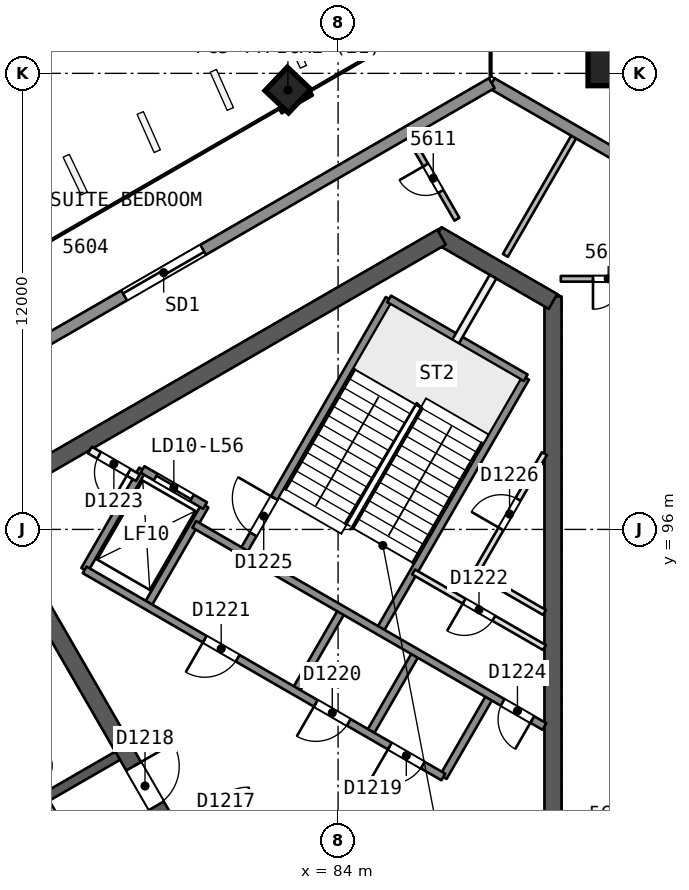
"""IFC4 building model, lengths in metres.
Left out: names, types, materials, properties, quantities, classifications, styles, units other than length and angle.
Written with IfcOpenShell. Run it as: python <this file> out.ifc"""

import sys

from ifc_helpers import new_model, si_unit, direction, frame, frame_2d, origin, origin_2d, place, context, subcontext, project, spatial, rectangle, extrude, element, fill, save


model = new_model("IFC4")
c1 = context("Model", 3, precision=1e-05, world=origin(), true_north=direction((0.0, 1.0)))
c2 = subcontext(c1, "Body", "Model", "MODEL_VIEW")
j1 = project(units=[si_unit("LENGTHUNIT", "METRE"), si_unit("PLANEANGLEUNIT", "RADIAN")], contexts=[c1])
p1 = place(None, origin())
s1 = spatial("IfcSite", under=j1, at=p1, CompositionType="ELEMENT")
p2 = place(p1, origin())
s2 = spatial("IfcBuilding", under=s1, at=p2, CompositionType="ELEMENT")
p3 = place(p2, frame((0.0, 0.0, 228.0)))
s3 = spatial("IfcBuildingStorey", under=s2, at=p3, CompositionType="ELEMENT", Elevation=228.0)
p4 = place(p3, frame((89.655, 88.019, 0.0), z_axis=(0.0, 0.0, 1.0), x_axis=(0.0, 1.0, 0.0)))
e1 = element("IfcWall", 1, at=p4, inside=s3, PredefinedType="SHEAR", context=c2, shape_type="SweptSolid", body=[
    extrude(rectangle(XDim=14.108, YDim=0.45, at=frame_2d((7.054, 0.0))), origin(), (0.0, 0.0, 1.0), 3.7),
])
p5 = place(p3, frame((89.655, 101.998, 0.0), z_axis=(0.0, 0.0, 1.0), x_axis=(-0.866042179588, 0.49997094233, 0.0)))
e2 = element("IfcWall", 2, at=p5, inside=s3, PredefinedType="SHEAR", context=c2, shape_type="SweptSolid", body=[
    extrude(rectangle(XDim=3.515, YDim=0.45, at=frame_2d((1.758, 0.0))), origin(), (0.0, 0.0, 1.0), 3.7),
])
p6 = place(p3, frame((86.723, 103.69, 0.0), z_axis=(0.0, 0.0, 1.0), x_axis=(-0.866022713978, -0.500004658852, 0.0)))
e3 = element("IfcWall", 3, at=p6, inside=s3, PredefinedType="SHEAR", context=c2, shape_type="SweptSolid", body=[
    extrude(rectangle(XDim=14.203, YDim=0.45, at=frame_2d((7.102, 0.0))), origin(), (0.0, 0.0, 1.0), 3.7),
])
p7 = place(p3, frame((74.617, 96.701, 0.0), z_axis=(0.0, 0.0, 1.0), x_axis=(0.499994385119, -0.866028645513, 0.0)))
e4 = element("IfcWall", 4, at=p7, inside=s3, PredefinedType="SHEAR", context=c2, shape_type="SweptSolid", body=[
    extrude(rectangle(XDim=10.155, YDim=0.45, at=frame_2d((5.077, 0.0))), origin(), (0.0, 0.0, 1.0), 3.7),
])
p8 = place(p7, frame((8.005, 0.0, 0.0)))
e5 = element("IfcOpeningElement", 5, at=p8, cuts=e4, PredefinedType="OPENING", context=c2, shape_type="SweptSolid", body=[
    extrude(rectangle(XDim=1.2, YDim=2.1, at=frame_2d((0.6, 1.05))), frame((0.0, 0.235, 0.0), z_axis=(0.0, -1.0, 0.0), x_axis=(1.0, 0.0, 0.0)), (0.0, 0.0, 1.0), 0.471),
])
p9 = place(p3, frame((78.2, 90.046, 0.0), z_axis=(0.0, 0.0, 1.0), x_axis=(-0.866026492143, -0.499998114903, 0.0)))
e6 = element("IfcWall", 6, at=p9, inside=s3, PredefinedType="SHEAR", context=c2, shape_type="SweptSolid", body=[
    extrude(rectangle(XDim=15.588, YDim=0.25, at=frame_2d((7.794, 0.0))), origin(), (0.0, 0.0, 1.0), 3.3),
])
p10 = place(p9, frame((2.15, 0.0, 0.0)))
e7 = element("IfcOpeningElement", 7, at=p10, cuts=e6, PredefinedType="OPENING", context=c2, shape_type="SweptSolid", body=[
    extrude(rectangle(XDim=1.0, YDim=2.1, at=frame_2d((0.5, 1.05))), frame((0.0, 0.135, 0.0), z_axis=(0.0, -1.0, 0.0), x_axis=(1.0, 0.0, 0.0)), (0.0, 0.0, 1.0), 0.271),
])
p11 = place(p9, frame((8.538, 0.0, 0.0)))
e8 = element("IfcOpeningElement", 8, at=p11, cuts=e6, PredefinedType="OPENING", context=c2, shape_type="SweptSolid", body=[
    extrude(rectangle(XDim=1.1, YDim=2.1, at=frame_2d((0.55, 1.05))), frame((0.0, 0.135, 0.0), z_axis=(0.0, -1.0, 0.0), x_axis=(1.0, 0.0, 0.0)), (0.0, 0.0, 1.0), 0.271),
])
p12 = place(p9, frame((12.282, 0.0, 0.0)))
e9 = element("IfcOpeningElement", 9, at=p12, cuts=e6, PredefinedType="OPENING", context=c2, shape_type="SweptSolid", body=[
    extrude(rectangle(XDim=1.0, YDim=2.1, at=frame_2d((0.5, 1.05))), frame((0.0, 0.135, 0.0), z_axis=(0.0, -1.0, 0.0), x_axis=(1.0, 0.0, 0.0)), (0.0, 0.0, 1.0), 0.271),
])
p13 = place(p3, frame((91.548, 108.662, 0.0), z_axis=(-0.017607037296, -0.030466109479, 0.999380712447), x_axis=(0.865812389079, -0.500368770925, 1.01334e-07)))
e10 = element("IfcColumn", 10, at=p13, inside=s3, PredefinedType="COLUMN", context=c2, shape_type="SweptSolid", body=[
    extrude(rectangle(XDim=1.9, YDim=1.9, at=origin_2d()), origin(), (0.0, 0.0, 1.0), 3.702),
])
p14 = place(p3, frame((82.69, 107.594, 0.0), z_axis=(-0.008376454378, -0.028163354484, 0.999568237028), x_axis=(0.865846453702, 0.49985452246, 0.021339517038)))
e11 = element("IfcColumn", 11, at=p14, inside=s3, PredefinedType="COLUMN", context=c2, shape_type="SweptSolid", body=[
    extrude(rectangle(XDim=0.85, YDim=0.85, at=origin_2d()), origin(), (0.0, 0.0, 1.0), 3.702),
])
p15 = place(p3, frame((92.354, 102.594, 0.0), z_axis=(0.0, 0.0, 1.0), x_axis=(-1.0, 0.0, 0.0)))
e12 = element("IfcWall", 12, at=p15, inside=s3, PredefinedType="PARTITIONING", context=c2, shape_type="SweptSolid", body=[
    extrude(rectangle(XDim=2.492, YDim=0.15, at=frame_2d((1.246, 0.0))), origin(), (0.0, 0.0, 1.0), 3.3),
])
p16 = place(p15, frame((0.846, 0.0, 0.0)))
e13 = element("IfcOpeningElement", 13, at=p16, cuts=e12, PredefinedType="OPENING", context=c2, shape_type="SweptSolid", body=[
    extrude(rectangle(XDim=0.8, YDim=2.1, at=frame_2d((0.4, 1.05))), frame((0.0, 0.085, 0.0), z_axis=(0.0, -1.0, 0.0), x_axis=(1.0, 0.0, 0.0)), (0.0, 0.0, 1.0), 0.171),
])
p17 = place(p3, frame((90.199, 106.324, 0.0), z_axis=(0.0, 0.0, 1.0), x_axis=(-0.500032055595, -0.866006895687, 0.0)))
e14 = element("IfcWall", 14, at=p17, inside=s3, PredefinedType="PARTITIONING", context=c2, shape_type="SweptSolid", body=[
    extrude(rectangle(XDim=3.595, YDim=0.15, at=frame_2d((1.797, 0.0))), origin(), (0.0, 0.0, 1.0), 3.3),
])
p18 = place(p3, frame((87.127, 104.162, 0.0), z_axis=(0.0, 0.0, 1.0), x_axis=(-0.500047477074, 0.865997991148, 0.0)))
e15 = element("IfcWall", 15, at=p18, inside=s3, PredefinedType="PARTITIONING", context=c2, shape_type="SweptSolid", body=[
    extrude(rectangle(XDim=2.492, YDim=0.15, at=frame_2d((1.246, 0.0))), origin(), (0.0, 0.0, 1.0), 3.3),
])
p19 = place(p18, frame((0.846, 0.0, 0.0)))
e16 = element("IfcOpeningElement", 16, at=p19, cuts=e15, PredefinedType="OPENING", context=c2, shape_type="SweptSolid", body=[
    extrude(rectangle(XDim=0.8, YDim=2.1, at=frame_2d((0.4, 1.05))), frame((0.0, 0.085, 0.0), z_axis=(0.0, -1.0, 0.0), x_axis=(1.0, 0.0, 0.0)), (0.0, 0.0, 1.0), 0.171),
])
p20 = place(p3, frame((88.043, 107.741, 0.0), z_axis=(0.0, 0.0, 1.0), x_axis=(0.866011086668, -0.500024797153, 0.0)))
e17 = element("IfcWall", 17, at=p20, inside=s3, PredefinedType="SOLIDWALL", context=c2, shape_type="SweptSolid", body=[
    extrude(rectangle(XDim=5.149, YDim=0.3, at=frame_2d((2.575, 0.0))), origin(), (0.0, 0.0, 1.0), 3.3),
])
p21 = place(p3, frame((44.454, 82.574, 0.0), z_axis=(0.0, 0.0, 1.0), x_axis=(0.86602387423, 0.500002649256, 0.0)))
e18 = element("IfcWall", 18, at=p21, inside=s3, PredefinedType="SOLIDWALL", context=c2, shape_type="SweptSolid", body=[
    extrude(rectangle(XDim=50.333, YDim=0.3, at=frame_2d((25.167, 0.0))), origin(), (0.0, 0.0, 1.0), 3.3),
])
p22 = place(p21, frame((24.122, 0.0, 0.0)))
e19 = element("IfcOpeningElement", 19, at=p22, cuts=e18, PredefinedType="OPENING", context=c2, shape_type="SweptSolid", body=[
    extrude(rectangle(XDim=2.4, YDim=2.4, at=frame_2d((1.2, 1.2))), frame((0.0, 0.161, 0.0), z_axis=(0.0, -1.0, 0.0), x_axis=(1.0, 0.0, 0.0)), (0.0, 0.0, 1.0), 0.321),
])
p23 = place(p21, frame((29.111, 0.0, 0.0)))
e20 = element("IfcOpeningElement", 20, at=p23, cuts=e18, PredefinedType="OPENING", context=c2, shape_type="SweptSolid", body=[
    extrude(rectangle(XDim=2.4, YDim=2.4, at=frame_2d((1.2, 1.2))), frame((0.0, 0.161, 0.0), z_axis=(0.0, -1.0, 0.0), x_axis=(1.0, 0.0, 0.0)), (0.0, 0.0, 1.0), 0.321),
])
p24 = place(p21, frame((39.164, 0.0, 0.0)))
e21 = element("IfcOpeningElement", 21, at=p24, cuts=e18, PredefinedType="OPENING", context=c2, shape_type="SweptSolid", body=[
    extrude(rectangle(XDim=2.4, YDim=2.4, at=frame_2d((1.2, 1.2))), frame((0.0, 0.161, 0.0), z_axis=(0.0, -1.0, 0.0), x_axis=(1.0, 0.0, 0.0)), (0.0, 0.0, 1.0), 0.321),
])
p25 = place(p21, frame((18.978, 0.0, 0.0)))
e22 = element("IfcOpeningElement", 22, at=p25, cuts=e18, PredefinedType="OPENING", context=c2, shape_type="SweptSolid", body=[
    extrude(rectangle(XDim=2.4, YDim=2.4, at=frame_2d((1.2, 1.2))), frame((0.0, 0.161, 0.0), z_axis=(0.0, -1.0, 0.0), x_axis=(1.0, 0.0, 0.0)), (0.0, 0.0, 1.0), 0.321),
])
p26 = place(p21, frame((8.763, 0.0, 0.0)))
e23 = element("IfcOpeningElement", 23, at=p26, cuts=e18, PredefinedType="OPENING", context=c2, shape_type="SweptSolid", body=[
    extrude(rectangle(XDim=2.4, YDim=2.4, at=frame_2d((1.2, 1.2))), frame((0.0, 0.161, 0.0), z_axis=(0.0, -1.0, 0.0), x_axis=(1.0, 0.0, 0.0)), (0.0, 0.0, 1.0), 0.321),
])
p27 = place(p3, frame((86.77, 89.486, 0.0), z_axis=(0.0, 0.0, 1.0), x_axis=(0.499961042966, 0.86604789447, 0.0)))
e24 = element("IfcWall", 24, at=p27, inside=s3, PredefinedType="SOLIDWALL", context=c2, shape_type="SweptSolid", body=[
    extrude(rectangle(XDim=2.48, YDim=0.2, at=frame_2d((1.24, 0.0))), origin(), (0.0, 0.0, 1.0), 3.3),
])
p28 = place(p3, frame((87.621, 94.86, 0.0), z_axis=(0.0, 0.0, 1.0), x_axis=(0.499993116331, 0.866029378036, 0.0)))
e25 = element("IfcWall", 25, at=p28, inside=s3, PredefinedType="PARTITIONING", context=c2, shape_type="SweptSolid", body=[
    extrude(rectangle(XDim=3.618, YDim=0.15, at=frame_2d((1.809, 0.0))), origin(), (0.0, 0.0, 1.0), 3.3),
])
p29 = place(p28, frame((1.332, 0.0, 0.0)))
e26 = element("IfcOpeningElement", 26, at=p29, cuts=e25, PredefinedType="OPENING", context=c2, shape_type="SweptSolid", body=[
    extrude(rectangle(XDim=0.9, YDim=2.1, at=frame_2d((0.45, 1.05))), frame((0.0, 0.085, 0.0), z_axis=(0.0, -1.0, 0.0), x_axis=(1.0, 0.0, 0.0)), (0.0, 0.0, 1.0), 0.171),
])
p30 = place(p3, frame((84.821, 90.611, 0.0), z_axis=(0.0, 0.0, 1.0), x_axis=(0.499961042966, 0.86604789447, 0.0)))
e27 = element("IfcWall", 27, at=p30, inside=s3, PredefinedType="SOLIDWALL", context=c2, shape_type="SweptSolid", body=[
    extrude(rectangle(XDim=2.48, YDim=0.2, at=frame_2d((1.24, 0.0))), origin(), (0.0, 0.0, 1.0), 3.3),
])
p31 = place(p3, frame((85.087, 93.321, 0.0), z_axis=(0.0, 0.0, 1.0), x_axis=(0.500019787375, 0.866013979237, 0.0)))
e28 = element("IfcWall", 28, at=p31, inside=s3, PredefinedType="SOLIDWALL", context=c2, shape_type="SweptSolid", body=[
    extrude(rectangle(XDim=7.7, YDim=0.2, at=frame_2d((3.85, 0.0))), origin(), (0.0, 0.0, 1.0), 3.3),
])
p32 = place(p3, frame((82.873, 91.736, 0.0), z_axis=(0.0, 0.0, 1.0), x_axis=(0.499961042966, 0.86604789447, 0.0)))
e29 = element("IfcWall", 29, at=p32, inside=s3, PredefinedType="SOLIDWALL", context=c2, shape_type="SweptSolid", body=[
    extrude(rectangle(XDim=2.48, YDim=0.2, at=frame_2d((1.24, 0.0))), origin(), (0.0, 0.0, 1.0), 3.3),
])
p33 = place(p3, frame((87.09, 100.94, 0.0), z_axis=(0.0, 0.0, 1.0), x_axis=(0.500011643316, 0.866018681408, 0.0)))
e30 = element("IfcWall", 30, at=p33, inside=s3, PredefinedType="PARTITIONING", context=c2, shape_type="SweptSolid", body=[
    extrude(rectangle(XDim=1.973, YDim=0.2, at=frame_2d((0.987, 0.0))), origin(), (0.0, 0.0, 1.0), 3.3),
])
p34 = place(p3, frame((81.493, 95.396, 0.0), z_axis=(0.0, 0.0, 1.0), x_axis=(0.500006057782, 0.866021906294, 0.0)))
e31 = element("IfcWall", 31, at=p34, inside=s3, PredefinedType="SOLIDWALL", context=c2, shape_type="SweptSolid", body=[
    extrude(rectangle(XDim=7.7, YDim=0.2, at=frame_2d((3.85, 0.0))), origin(), (0.0, 0.0, 1.0), 3.3),
])
p35 = place(p34, frame((0.55, 0.0, 0.0)))
e32 = element("IfcOpeningElement", 32, at=p35, cuts=e31, PredefinedType="OPENING", context=c2, shape_type="SweptSolid", body=[
    extrude(rectangle(XDim=1.1, YDim=2.1, at=frame_2d((0.55, 1.05))), frame((0.0, 0.11, 0.0), z_axis=(0.0, -1.0, 0.0), x_axis=(1.0, 0.0, 0.0)), (0.0, 0.0, 1.0), 0.221),
])
for number, where, z_axis, x_axis in (
    (33, (78.976, 93.986, 0.0), (0.0, 0.0, 1.0), (0.5, 0.866, 0.0)),
    (34, (77.33, 94.936, 0.0), (0.0, 0.0, 1.0), (0.5, 0.866, 0.0)),
):
    element("IfcWall", number, at=place(p3, frame(where, z_axis=z_axis, x_axis=x_axis)), inside=s3, PredefinedType="SOLIDWALL", context=c2, shape_type="SweptSolid", body=[
        extrude(rectangle(XDim=3.05, YDim=0.2, at=frame_2d((1.525, 0.0))), origin(), (0.0, 0.0, 1.0), 3.3),
    ])
p36 = place(p3, frame((86.77, 89.486, 0.0), z_axis=(0.0, 0.0, 1.0), x_axis=(-0.86601811187, 0.500012629753, 0.0)))
e35 = element("IfcWall", 35, at=p36, inside=s3, PredefinedType="SOLIDWALL", context=c2, shape_type="SweptSolid", body=[
    extrude(rectangle(XDim=10.9, YDim=0.2, at=frame_2d((5.45, 0.0))), origin(), (0.0, 0.0, 1.0), 3.3),
])
p37 = place(p36, frame((0.625, 0.0, 0.0)))
e36 = element("IfcOpeningElement", 36, at=p37, cuts=e35, PredefinedType="OPENING", context=c2, shape_type="SweptSolid", body=[
    extrude(rectangle(XDim=1.0, YDim=2.1, at=frame_2d((0.5, 1.05))), frame((0.0, 0.11, 0.0), z_axis=(0.0, -1.0, 0.0), x_axis=(1.0, 0.0, 0.0)), (0.0, 0.0, 1.0), 0.221),
])
p38 = place(p36, frame((2.875, 0.0, 0.0)))
e37 = element("IfcOpeningElement", 37, at=p38, cuts=e35, PredefinedType="OPENING", context=c2, shape_type="SweptSolid", body=[
    extrude(rectangle(XDim=1.0, YDim=2.1, at=frame_2d((0.5, 1.05))), frame((0.0, 0.11, 0.0), z_axis=(0.0, -1.0, 0.0), x_axis=(1.0, 0.0, 0.0)), (0.0, 0.0, 1.0), 0.221),
])
p39 = place(p36, frame((6.25, 0.0, 0.0)))
e38 = element("IfcOpeningElement", 38, at=p39, cuts=e35, PredefinedType="OPENING", context=c2, shape_type="SweptSolid", body=[
    extrude(rectangle(XDim=1.0, YDim=2.1, at=frame_2d((0.5, 1.05))), frame((0.0, 0.11, 0.0), z_axis=(0.0, -1.0, 0.0), x_axis=(1.0, 0.0, 0.0)), (0.0, 0.0, 1.0), 0.221),
])
p40 = place(p3, frame((89.43, 90.814, 0.0), z_axis=(0.0, 0.0, 1.0), x_axis=(-0.866018983788, 0.500011119594, 0.0)))
e39 = element("IfcWall", 39, at=p40, inside=s3, PredefinedType="SOLIDWALL", context=c2, shape_type="SweptSolid", body=[
    extrude(rectangle(XDim=10.64, YDim=0.2, at=frame_2d((5.32, 0.0))), origin(), (0.0, 0.0, 1.0), 3.3),
])
p41 = place(p40, frame((0.37, 0.0, 0.0)))
e40 = element("IfcOpeningElement", 40, at=p41, cuts=e39, PredefinedType="OPENING", context=c2, shape_type="SweptSolid", body=[
    extrude(rectangle(XDim=0.9, YDim=2.1, at=frame_2d((0.45, 1.05))), frame((0.0, 0.11, 0.0), z_axis=(0.0, -1.0, 0.0), x_axis=(1.0, 0.0, 0.0)), (0.0, 0.0, 1.0), 0.221),
])
p42 = place(p3, frame((78.73, 97.361, 0.0), z_axis=(0.0, 0.0, 1.0), x_axis=(-0.866045896294, 0.499964504253, 0.0)))
e41 = element("IfcWall", 41, at=p42, inside=s3, PredefinedType="PARTITIONING", context=c2, shape_type="SweptSolid", body=[
    extrude(rectangle(XDim=1.455, YDim=0.2, at=frame_2d((0.728, 0.0))), origin(), (0.0, 0.0, 1.0), 3.3),
])
p43 = place(p42, frame((0.278, 0.0, 0.0)))
e42 = element("IfcOpeningElement", 42, at=p43, cuts=e41, PredefinedType="OPENING", context=c2, shape_type="SweptSolid", body=[
    extrude(rectangle(XDim=0.9, YDim=2.1, at=frame_2d((0.45, 1.05))), frame((0.0, 0.11, 0.0), z_axis=(0.0, -1.0, 0.0), x_axis=(1.0, 0.0, 0.0)), (0.0, 0.0, 1.0), 0.221),
])
p44 = place(p3, frame((80.5, 96.627, 0.0), z_axis=(0.0, 0.0, 1.0), x_axis=(-0.86601224135, 0.500022797313, 0.0)))
e43 = element("IfcWall", 43, at=p44, inside=s3, PredefinedType="SOLIDWALL", context=c2, shape_type="SweptSolid", body=[
    extrude(rectangle(XDim=1.9, YDim=0.2, at=frame_2d((0.95, 0.0))), origin(), (0.0, 0.0, 1.0), 3.3),
])
p45 = place(p44, frame((0.4, 0.0, 0.0)))
e44 = element("IfcOpeningElement", 44, at=p45, cuts=e43, PredefinedType="OPENING", context=c2, shape_type="SweptSolid", body=[
    extrude(rectangle(XDim=1.1, YDim=2.1, at=frame_2d((0.55, 1.05))), frame((0.0, 0.11, 0.0), z_axis=(0.0, -1.0, 0.0), x_axis=(1.0, 0.0, 0.0)), (0.0, 0.0, 1.0), 0.221),
])
p46 = place(p3, frame((89.43, 92.892, 0.0), z_axis=(0.0, 0.0, 1.0), x_axis=(-0.866019912421, 0.500009511199, 0.0)))
e45 = element("IfcWall", 45, at=p46, inside=s3, PredefinedType="PARTITIONING", context=c2, shape_type="SweptSolid", body=[
    extrude(rectangle(XDim=3.976, YDim=0.15, at=frame_2d((1.988, 0.0))), origin(), (0.0, 0.0, 1.0), 3.3),
])
p47 = place(p46, frame((1.538, 0.0, 0.0)))
e46 = element("IfcOpeningElement", 46, at=p47, cuts=e45, PredefinedType="OPENING", context=c2, shape_type="SweptSolid", body=[
    extrude(rectangle(XDim=0.9, YDim=2.1, at=frame_2d((0.45, 1.05))), frame((0.0, 0.085, 0.0), z_axis=(0.0, -1.0, 0.0), x_axis=(1.0, 0.0, 0.0)), (0.0, 0.0, 1.0), 0.171),
])
p48 = place(p3, frame((89.43, 93.816, 0.0), z_axis=(0.0, 0.0, 1.0), x_axis=(-0.866004557827, 0.500036104519, 0.0)))
e47 = element("IfcWall", 47, at=p48, inside=s3, PredefinedType="PARTITIONING", context=c2, shape_type="SweptSolid", body=[
    extrude(rectangle(XDim=2.089, YDim=0.15, at=frame_2d((1.044, 0.0))), origin(), (0.0, 0.0, 1.0), 3.3),
])
p49 = place(p3, frame((88.937, 99.99, 0.0), z_axis=(0.0, 0.0, 1.0), x_axis=(-0.866004344652, 0.500036473714, 0.0)))
e48 = element("IfcWall", 48, at=p49, inside=s3, PredefinedType="SOLIDWALL", context=c2, shape_type="SweptSolid", body=[
    extrude(rectangle(XDim=4.15, YDim=0.2, at=frame_2d((2.075, 0.0))), origin(), (0.0, 0.0, 1.0), 3.3),
])
p50 = place(p16, origin())
e49 = element("IfcDoor", 49, at=p50, inside=s3, OperationType="SINGLE_SWING_RIGHT", PredefinedType="NOTDEFINED", context=c2, shape_type="SweptSolid", body=[
    extrude(rectangle(XDim=0.8, YDim=2.1, at=frame_2d((0.4, 1.05))), frame((0.0, 0.025, 0.0), z_axis=(0.0, -1.0, 0.0), x_axis=(1.0, 0.0, 0.0)), (0.0, 0.0, 1.0), 0.05),
])
fill(e13, e49)
p51 = place(p19, origin())
e50 = element("IfcDoor", 50, at=p51, inside=s3, OperationType="SINGLE_SWING_RIGHT", PredefinedType="NOTDEFINED", context=c2, shape_type="SweptSolid", body=[
    extrude(rectangle(XDim=0.8, YDim=2.1, at=frame_2d((0.4, 1.05))), frame((0.0, 0.025, 0.0), z_axis=(0.0, -1.0, 0.0), x_axis=(1.0, 0.0, 0.0)), (0.0, 0.0, 1.0), 0.05),
])
fill(e16, e50)
p52 = place(p24, origin())
e51 = element("IfcDoor", 51, at=p52, inside=s3, OperationType="SLIDING_TO_LEFT", PredefinedType="NOTDEFINED", context=c2, shape_type="SweptSolid", body=[
    extrude(rectangle(XDim=2.4, YDim=2.4, at=frame_2d((1.2, 1.2))), frame((0.0, 0.025, 0.0), z_axis=(0.0, -1.0, 0.0), x_axis=(1.0, 0.0, 0.0)), (0.0, 0.0, 1.0), 0.05),
])
fill(e21, e51)
p53 = place(p8, origin())
e52 = element("IfcDoor", 52, at=p53, inside=s3, OperationType="SINGLE_SWING_LEFT", PredefinedType="NOTDEFINED", context=c2, shape_type="SweptSolid", body=[
    extrude(rectangle(XDim=1.2, YDim=2.1, at=frame_2d((0.6, 1.05))), frame((0.0, 0.025, 0.0), z_axis=(0.0, -1.0, 0.0), x_axis=(1.0, 0.0, 0.0)), (0.0, 0.0, 1.0), 0.05),
])
fill(e5, e52)
p54 = place(p45, origin())
e53 = element("IfcDoor", 53, at=p54, inside=s3, OperationType="SLIDING_TO_RIGHT", PredefinedType="NOTDEFINED", context=c2, shape_type="SweptSolid", body=[
    extrude(rectangle(XDim=1.1, YDim=2.1, at=frame_2d((0.55, 1.05))), frame((0.0, 0.025, 0.0), z_axis=(0.0, -1.0, 0.0), x_axis=(1.0, 0.0, 0.0)), (0.0, 0.0, 1.0), 0.05),
])
fill(e44, e53)
p55 = place(p37, origin())
e54 = element("IfcDoor", 54, at=p55, inside=s3, OperationType="SINGLE_SWING_RIGHT", PredefinedType="NOTDEFINED", context=c2, shape_type="SweptSolid", body=[
    extrude(rectangle(XDim=1.0, YDim=2.1, at=frame_2d((0.5, 1.05))), frame((0.0, 0.025, 0.0), z_axis=(0.0, -1.0, 0.0), x_axis=(1.0, 0.0, 0.0)), (0.0, 0.0, 1.0), 0.05),
])
fill(e36, e54)
p56 = place(p38, origin())
e55 = element("IfcDoor", 55, at=p56, inside=s3, OperationType="SINGLE_SWING_RIGHT", PredefinedType="NOTDEFINED", context=c2, shape_type="SweptSolid", body=[
    extrude(rectangle(XDim=1.0, YDim=2.1, at=frame_2d((0.5, 1.05))), frame((0.0, 0.025, 0.0), z_axis=(0.0, -1.0, 0.0), x_axis=(1.0, 0.0, 0.0)), (0.0, 0.0, 1.0), 0.05),
])
fill(e37, e55)
p57 = place(p39, origin())
e56 = element("IfcDoor", 56, at=p57, inside=s3, OperationType="SINGLE_SWING_RIGHT", PredefinedType="NOTDEFINED", context=c2, shape_type="SweptSolid", body=[
    extrude(rectangle(XDim=1.0, YDim=2.1, at=frame_2d((0.5, 1.05))), frame((0.0, 0.025, 0.0), z_axis=(0.0, -1.0, 0.0), x_axis=(1.0, 0.0, 0.0)), (0.0, 0.0, 1.0), 0.05),
])
fill(e38, e56)
p58 = place(p47, origin())
e57 = element("IfcDoor", 57, at=p58, inside=s3, OperationType="SINGLE_SWING_RIGHT", PredefinedType="NOTDEFINED", context=c2, shape_type="SweptSolid", body=[
    extrude(rectangle(XDim=0.9, YDim=2.1, at=frame_2d((0.45, 1.05))), frame((0.0, 0.025, 0.0), z_axis=(0.0, -1.0, 0.0), x_axis=(1.0, 0.0, 0.0)), (0.0, 0.0, 1.0), 0.05),
])
fill(e46, e57)
p59 = place(p43, origin())
e58 = element("IfcDoor", 58, at=p59, inside=s3, OperationType="SINGLE_SWING_LEFT", PredefinedType="NOTDEFINED", context=c2, shape_type="SweptSolid", body=[
    extrude(rectangle(XDim=0.9, YDim=2.1, at=frame_2d((0.45, 1.05))), frame((0.0, 0.025, 0.0), z_axis=(0.0, -1.0, 0.0), x_axis=(1.0, 0.0, 0.0)), (0.0, 0.0, 1.0), 0.05),
])
fill(e42, e58)
p60 = place(p41, origin())
e59 = element("IfcDoor", 59, at=p60, inside=s3, OperationType="SINGLE_SWING_LEFT", PredefinedType="NOTDEFINED", context=c2, shape_type="SweptSolid", body=[
    extrude(rectangle(XDim=0.9, YDim=2.1, at=frame_2d((0.45, 1.05))), frame((0.0, 0.025, 0.0), z_axis=(0.0, -1.0, 0.0), x_axis=(1.0, 0.0, 0.0)), (0.0, 0.0, 1.0), 0.05),
])
fill(e40, e59)
p61 = place(p35, origin())
e60 = element("IfcDoor", 60, at=p61, inside=s3, OperationType="SINGLE_SWING_RIGHT", PredefinedType="NOTDEFINED", context=c2, shape_type="SweptSolid", body=[
    extrude(rectangle(XDim=1.1, YDim=2.1, at=frame_2d((0.55, 1.05))), frame((0.0, 0.025, 0.0), z_axis=(0.0, -1.0, 0.0), x_axis=(1.0, 0.0, 0.0)), (0.0, 0.0, 1.0), 0.05),
])
fill(e32, e60)
p62 = place(p29, origin())
e61 = element("IfcDoor", 61, at=p62, inside=s3, OperationType="SINGLE_SWING_LEFT", PredefinedType="NOTDEFINED", context=c2, shape_type="SweptSolid", body=[
    extrude(rectangle(XDim=0.9, YDim=2.1, at=frame_2d((0.45, 1.05))), frame((0.0, 0.025, 0.0), z_axis=(0.0, -1.0, 0.0), x_axis=(1.0, 0.0, 0.0)), (0.0, 0.0, 1.0), 0.05),
])
fill(e26, e61)
save(model, sys.argv[1])
